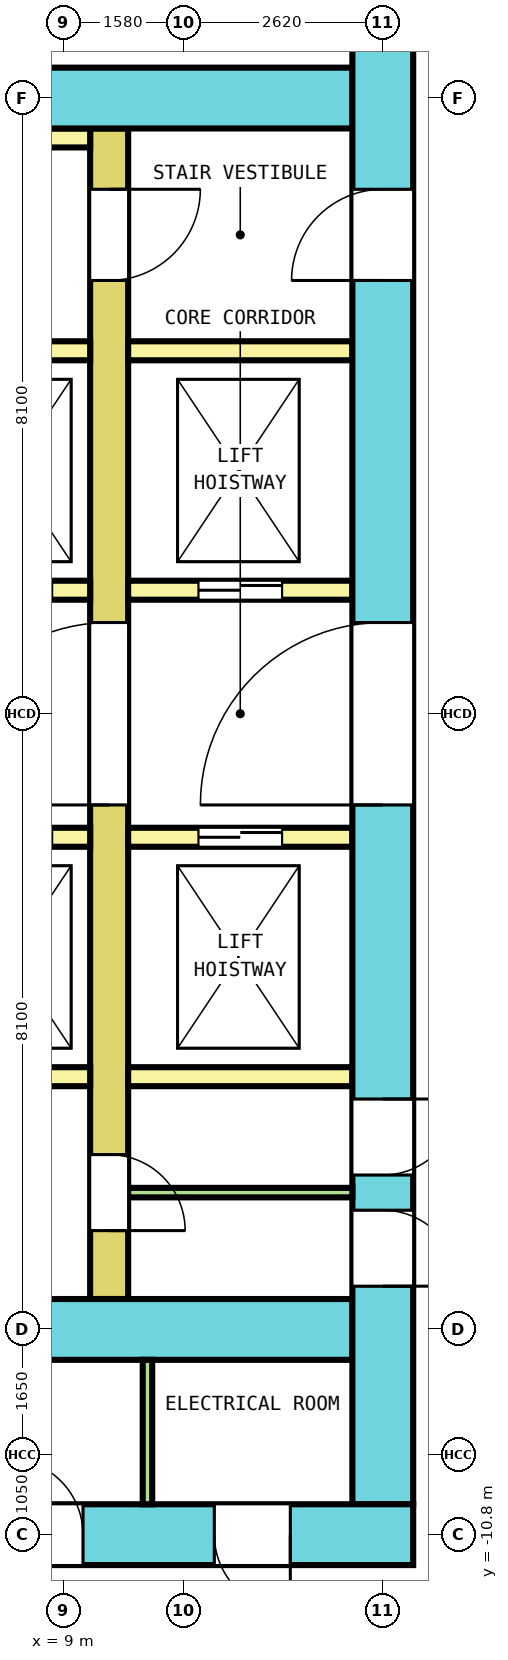
"""IFC4 building model, lengths in metres.
Left out: names, types, materials, properties, quantities, classifications, styles, units other than length and angle.
Written with IfcOpenShell. Run it as: python <this file> out.ifc"""

import sys

from ifc_helpers import new_model, si_unit, direction, frame, frame_2d, origin, place, context, subcontext, project, spatial, rectangle, extrude, element, fill, save


model = new_model("IFC4")
c1 = context("Model", 3, precision=1e-05, world=origin(), true_north=direction((0.0, 1.0)))
c2 = subcontext(c1, "Body", "Model", "MODEL_VIEW")
j1 = project(units=[si_unit("LENGTHUNIT", "METRE"), si_unit("PLANEANGLEUNIT", "RADIAN")], contexts=[c1])
p1 = place(None, origin())
s1 = spatial("IfcSite", under=j1, at=p1, CompositionType="ELEMENT")
p2 = place(p1, origin())
s2 = spatial("IfcBuilding", under=s1, at=p2, CompositionType="ELEMENT")
p3 = place(p2, frame((0.0, 0.0, 85.2)))
s3 = spatial("IfcBuildingStorey", under=s2, at=p3, CompositionType="ELEMENT", Elevation=85.2)
p4 = place(p3, frame((-13.6, -10.8, 0.0), z_axis=(0.0, 0.0, 1.0), x_axis=(1.0, 0.0, 0.0)))
e1 = element("IfcWall", 1, at=p4, inside=s3, PredefinedType="SHEAR", context=c2, shape_type="SweptSolid", body=[
    extrude(rectangle(XDim=27.2, YDim=0.8, at=frame_2d((13.6, 0.0))), origin(), (0.0, 0.0, 1.0), 4.1),
])
p5 = place(p4, frame((2.333, 0.0, 0.0)))
e2 = element("IfcOpeningElement", 2, at=p5, cuts=e1, PredefinedType="OPENING", context=c2, shape_type="SweptSolid", body=[
    extrude(rectangle(XDim=1.0, YDim=2.1, at=frame_2d((0.5, 1.05))), frame((0.0, 0.41, 0.0), z_axis=(0.0, -1.0, 0.0), x_axis=(1.0, 0.0, 0.0)), (0.0, 0.0, 1.0), 0.82),
])
p6 = place(p4, frame((6.494, 0.0, 0.0)))
e3 = element("IfcOpeningElement", 3, at=p6, cuts=e1, PredefinedType="OPENING", context=c2, shape_type="SweptSolid", body=[
    extrude(rectangle(XDim=1.0, YDim=2.1, at=frame_2d((0.5, 1.05))), frame((0.0, 0.41, 0.0), z_axis=(0.0, -1.0, 0.0), x_axis=(1.0, 0.0, 0.0)), (0.0, 0.0, 1.0), 0.82),
])
p7 = place(p4, frame((10.623, 0.0, 0.0)))
e4 = element("IfcOpeningElement", 4, at=p7, cuts=e1, PredefinedType="OPENING", context=c2, shape_type="SweptSolid", body=[
    extrude(rectangle(XDim=1.0, YDim=2.1, at=frame_2d((0.5, 1.05))), frame((0.0, 0.41, 0.0), z_axis=(0.0, -1.0, 0.0), x_axis=(1.0, 0.0, 0.0)), (0.0, 0.0, 1.0), 0.82),
])
p8 = place(p4, frame((19.16, 0.0, 0.0)))
e5 = element("IfcOpeningElement", 5, at=p8, cuts=e1, PredefinedType="OPENING", context=c2, shape_type="SweptSolid", body=[
    extrude(rectangle(XDim=1.0, YDim=2.1, at=frame_2d((0.5, 1.05))), frame((0.0, 0.41, 0.0), z_axis=(0.0, -1.0, 0.0), x_axis=(1.0, 0.0, 0.0)), (0.0, 0.0, 1.0), 0.82),
])
p9 = place(p4, frame((21.856, 0.0, 0.0)))
e6 = element("IfcOpeningElement", 6, at=p9, cuts=e1, PredefinedType="OPENING", context=c2, shape_type="SweptSolid", body=[
    extrude(rectangle(XDim=1.0, YDim=2.1, at=frame_2d((0.5, 1.05))), frame((0.0, 0.41, 0.0), z_axis=(0.0, -1.0, 0.0), x_axis=(1.0, 0.0, 0.0)), (0.0, 0.0, 1.0), 0.82),
])
p10 = place(p4, frame((24.583, 0.0, 0.0)))
e7 = element("IfcOpeningElement", 7, at=p10, cuts=e1, PredefinedType="OPENING", context=c2, shape_type="SweptSolid", body=[
    extrude(rectangle(XDim=1.0, YDim=2.1, at=frame_2d((0.5, 1.05))), frame((0.0, 0.41, 0.0), z_axis=(0.0, -1.0, 0.0), x_axis=(1.0, 0.0, 0.0)), (0.0, 0.0, 1.0), 0.82),
])
p11 = place(p4, frame((15.15, 0.0, 0.0)))
e8 = element("IfcOpeningElement", 8, at=p11, cuts=e1, PredefinedType="OPENING", context=c2, shape_type="SweptSolid", body=[
    extrude(rectangle(XDim=1.2, YDim=2.1, at=frame_2d((0.6, 1.05))), frame((0.0, 0.41, 0.0), z_axis=(0.0, -1.0, 0.0), x_axis=(1.0, 0.0, 0.0)), (0.0, 0.0, 1.0), 0.82),
])
p12 = place(p3, frame((13.2, -10.4, 0.0), z_axis=(0.0, 0.0, 1.0), x_axis=(0.0, 1.0, 0.0)))
e9 = element("IfcWall", 9, at=p12, inside=s3, PredefinedType="SHEAR", context=c2, shape_type="SweptSolid", body=[
    extrude(rectangle(XDim=20.8, YDim=0.8, at=frame_2d((10.4, 0.0))), origin(), (0.0, 0.0, 1.0), 4.1),
])
p13 = place(p12, frame((9.2, 0.0, 0.0)))
e10 = element("IfcOpeningElement", 10, at=p13, cuts=e9, PredefinedType="OPENING", context=c2, shape_type="SweptSolid", body=[
    extrude(rectangle(XDim=2.4, YDim=2.1, at=frame_2d((1.2, 1.05))), frame((0.0, 0.41, 0.0), z_axis=(0.0, -1.0, 0.0), x_axis=(1.0, 0.0, 0.0)), (0.0, 0.0, 1.0), 0.82),
])
p14 = place(p12, frame((16.1, 0.0, 0.0)))
e11 = element("IfcOpeningElement", 11, at=p14, cuts=e9, PredefinedType="OPENING", context=c2, shape_type="SweptSolid", body=[
    extrude(rectangle(XDim=1.2, YDim=2.1, at=frame_2d((0.6, 1.05))), frame((0.0, 0.41, 0.0), z_axis=(0.0, -1.0, 0.0), x_axis=(1.0, 0.0, 0.0)), (0.0, 0.0, 1.0), 0.82),
])
p15 = place(p12, frame((2.869, 0.0, 0.0)))
e12 = element("IfcOpeningElement", 12, at=p15, cuts=e9, PredefinedType="OPENING", context=c2, shape_type="SweptSolid", body=[
    extrude(rectangle(XDim=1.0, YDim=2.1, at=frame_2d((0.5, 1.05))), frame((0.0, 0.41, 0.0), z_axis=(0.0, -1.0, 0.0), x_axis=(1.0, 0.0, 0.0)), (0.0, 0.0, 1.0), 0.82),
])
p16 = place(p12, frame((4.331, 0.0, 0.0)))
e13 = element("IfcOpeningElement", 13, at=p16, cuts=e9, PredefinedType="OPENING", context=c2, shape_type="SweptSolid", body=[
    extrude(rectangle(XDim=1.0, YDim=2.1, at=frame_2d((0.5, 1.05))), frame((0.0, 0.41, 0.0), z_axis=(0.0, -1.0, 0.0), x_axis=(1.0, 0.0, 0.0)), (0.0, 0.0, 1.0), 0.82),
])
p17 = place(p3, frame((-12.8, 8.1, 0.0), z_axis=(0.0, 0.0, 1.0), x_axis=(1.0, 0.0, 0.0)))
e14 = element("IfcWall", 14, at=p17, inside=s3, PredefinedType="SHEAR", context=c2, shape_type="SweptSolid", body=[
    extrude(rectangle(XDim=25.6, YDim=0.8, at=frame_2d((12.8, 0.0))), origin(), (0.0, 0.0, 1.0), 4.1),
])
p18 = place(p17, frame((13.725, 0.0, 0.0)))
e15 = element("IfcOpeningElement", 15, at=p18, cuts=e14, PredefinedType="OPENING", context=c2, shape_type="SweptSolid", body=[
    extrude(rectangle(XDim=1.4, YDim=2.1, at=frame_2d((0.7, 1.05))), frame((0.0, 0.41, 0.0), z_axis=(0.0, -1.0, 0.0), x_axis=(1.0, 0.0, 0.0)), (0.0, 0.0, 1.0), 0.82),
])
p19 = place(p3, frame((-12.8, -8.1, 0.0), z_axis=(0.0, 0.0, 1.0), x_axis=(1.0, 0.0, 0.0)))
e16 = element("IfcWall", 16, at=p19, inside=s3, PredefinedType="SHEAR", context=c2, shape_type="SweptSolid", body=[
    extrude(rectangle(XDim=25.6, YDim=0.8, at=frame_2d((12.8, 0.0))), origin(), (0.0, 0.0, 1.0), 4.1),
])
p20 = place(p19, frame((14.35, 0.0, 0.0)))
e17 = element("IfcOpeningElement", 17, at=p20, cuts=e16, PredefinedType="OPENING", context=c2, shape_type="SweptSolid", body=[
    extrude(rectangle(XDim=1.2, YDim=2.1, at=frame_2d((0.6, 1.05))), frame((0.0, 0.41, 0.0), z_axis=(0.0, -1.0, 0.0), x_axis=(1.0, 0.0, 0.0)), (0.0, 0.0, 1.0), 0.82),
])
p21 = place(p3, frame((9.6, -7.7, 0.0), z_axis=(0.0, 0.0, 1.0), x_axis=(0.0, 1.0, 0.0)))
e18 = element("IfcWall", 18, at=p21, inside=s3, PredefinedType="SHEAR", context=c2, shape_type="SweptSolid", body=[
    extrude(rectangle(XDim=15.4, YDim=0.5, at=frame_2d((7.7, 0.0))), origin(), (0.0, 0.0, 1.0), 4.1),
])
p22 = place(p21, frame((6.5, 0.0, 0.0)))
e19 = element("IfcOpeningElement", 19, at=p22, cuts=e18, PredefinedType="OPENING", context=c2, shape_type="SweptSolid", body=[
    extrude(rectangle(XDim=2.4, YDim=2.1, at=frame_2d((1.2, 1.05))), frame((0.0, 0.26, 0.0), z_axis=(0.0, -1.0, 0.0), x_axis=(1.0, 0.0, 0.0)), (0.0, 0.0, 1.0), 0.52),
])
p23 = place(p21, frame((13.4, 0.0, 0.0)))
e20 = element("IfcOpeningElement", 20, at=p23, cuts=e18, PredefinedType="OPENING", context=c2, shape_type="SweptSolid", body=[
    extrude(rectangle(XDim=1.2, YDim=2.1, at=frame_2d((0.6, 1.05))), frame((0.0, 0.26, 0.0), z_axis=(0.0, -1.0, 0.0), x_axis=(1.0, 0.0, 0.0)), (0.0, 0.0, 1.0), 0.52),
])
p24 = place(p21, frame((0.9, 0.0, 0.0)))
e21 = element("IfcOpeningElement", 21, at=p24, cuts=e18, PredefinedType="OPENING", context=c2, shape_type="SweptSolid", body=[
    extrude(rectangle(XDim=1.0, YDim=2.1, at=frame_2d((0.5, 1.05))), frame((0.0, 0.26, 0.0), z_axis=(0.0, -1.0, 0.0), x_axis=(1.0, 0.0, 0.0)), (0.0, 0.0, 1.0), 0.52),
])
p25 = place(p3, frame((-9.35, 1.625, 0.0), z_axis=(0.0, 0.0, 1.0), x_axis=(1.0, 0.0, 0.0)))
e22 = element("IfcWall", 22, at=p25, inside=s3, PredefinedType="SOLIDWALL", context=c2, shape_type="SweptSolid", body=[
    extrude(rectangle(XDim=18.7, YDim=0.25, at=frame_2d((9.35, 0.0))), origin(), (0.0, 0.0, 1.0), 4.1),
])
p26 = place(p25, frame((0.5, 0.0, 0.0)))
e23 = element("IfcOpeningElement", 23, at=p26, cuts=e22, PredefinedType="OPENING", context=c2, shape_type="SweptSolid", body=[
    extrude(rectangle(XDim=1.1, YDim=2.1, at=frame_2d((0.55, 1.05))), frame((0.0, 0.135, 0.0), z_axis=(0.0, -1.0, 0.0), x_axis=(1.0, 0.0, 0.0)), (0.0, 0.0, 1.0), 0.27),
])
p27 = place(p25, frame((17.1, 0.0, 0.0)))
e24 = element("IfcOpeningElement", 24, at=p27, cuts=e22, PredefinedType="OPENING", context=c2, shape_type="SweptSolid", body=[
    extrude(rectangle(XDim=1.1, YDim=2.1, at=frame_2d((0.55, 1.05))), frame((0.0, 0.135, 0.0), z_axis=(0.0, -1.0, 0.0), x_axis=(1.0, 0.0, 0.0)), (0.0, 0.0, 1.0), 0.27),
])
p28 = place(p3, frame((9.85, 1.625, 0.0), z_axis=(0.0, 0.0, 1.0), x_axis=(1.0, 0.0, 0.0)))
e25 = element("IfcWall", 25, at=p28, inside=s3, PredefinedType="SOLIDWALL", context=c2, shape_type="SweptSolid", body=[
    extrude(rectangle(XDim=2.95, YDim=0.25, at=frame_2d((1.475, 0.0))), origin(), (0.0, 0.0, 1.0), 4.1),
])
p29 = place(p28, frame((0.925, 0.0, 0.0)))
e26 = element("IfcOpeningElement", 26, at=p29, cuts=e25, PredefinedType="OPENING", context=c2, shape_type="SweptSolid", body=[
    extrude(rectangle(XDim=1.1, YDim=2.1, at=frame_2d((0.55, 1.05))), frame((0.0, 0.135, 0.0), z_axis=(0.0, -1.0, 0.0), x_axis=(1.0, 0.0, 0.0)), (0.0, 0.0, 1.0), 0.27),
])
p30 = place(p3, frame((-9.35, 4.775, 0.0), z_axis=(0.0, 0.0, 1.0), x_axis=(1.0, 0.0, 0.0)))
e27 = element("IfcWall", 27, at=p30, inside=s3, PredefinedType="SOLIDWALL", context=c2, shape_type="SweptSolid", body=[
    extrude(rectangle(XDim=18.7, YDim=0.25, at=frame_2d((9.35, 0.0))), origin(), (0.0, 0.0, 1.0), 4.1),
])
p31 = place(p3, frame((9.85, 4.775, 0.0), z_axis=(0.0, 0.0, 1.0), x_axis=(1.0, 0.0, 0.0)))
e28 = element("IfcWall", 28, at=p31, inside=s3, PredefinedType="SOLIDWALL", context=c2, shape_type="SweptSolid", body=[
    extrude(rectangle(XDim=2.95, YDim=0.25, at=frame_2d((1.475, 0.0))), origin(), (0.0, 0.0, 1.0), 4.1),
])
p32 = place(p3, frame((-9.35, -1.625, 0.0), z_axis=(0.0, 0.0, 1.0), x_axis=(1.0, 0.0, 0.0)))
e29 = element("IfcWall", 29, at=p32, inside=s3, PredefinedType="SOLIDWALL", context=c2, shape_type="SweptSolid", body=[
    extrude(rectangle(XDim=18.7, YDim=0.25, at=frame_2d((9.35, 0.0))), origin(), (0.0, 0.0, 1.0), 4.1),
])
p33 = place(p32, frame((0.5, 0.0, 0.0)))
e30 = element("IfcOpeningElement", 30, at=p33, cuts=e29, PredefinedType="OPENING", context=c2, shape_type="SweptSolid", body=[
    extrude(rectangle(XDim=1.1, YDim=2.1, at=frame_2d((0.55, 1.05))), frame((0.0, 0.135, 0.0), z_axis=(0.0, -1.0, 0.0), x_axis=(1.0, 0.0, 0.0)), (0.0, 0.0, 1.0), 0.27),
])
p34 = place(p32, frame((17.1, 0.0, 0.0)))
e31 = element("IfcOpeningElement", 31, at=p34, cuts=e29, PredefinedType="OPENING", context=c2, shape_type="SweptSolid", body=[
    extrude(rectangle(XDim=1.1, YDim=2.1, at=frame_2d((0.55, 1.05))), frame((0.0, 0.135, 0.0), z_axis=(0.0, -1.0, 0.0), x_axis=(1.0, 0.0, 0.0)), (0.0, 0.0, 1.0), 0.27),
])
p35 = place(p3, frame((9.85, -1.625, 0.0), z_axis=(0.0, 0.0, 1.0), x_axis=(1.0, 0.0, 0.0)))
e32 = element("IfcWall", 32, at=p35, inside=s3, PredefinedType="SOLIDWALL", context=c2, shape_type="SweptSolid", body=[
    extrude(rectangle(XDim=2.95, YDim=0.25, at=frame_2d((1.475, 0.0))), origin(), (0.0, 0.0, 1.0), 4.1),
])
p36 = place(p35, frame((0.925, 0.0, 0.0)))
e33 = element("IfcOpeningElement", 33, at=p36, cuts=e32, PredefinedType="OPENING", context=c2, shape_type="SweptSolid", body=[
    extrude(rectangle(XDim=1.1, YDim=2.1, at=frame_2d((0.55, 1.05))), frame((0.0, 0.135, 0.0), z_axis=(0.0, -1.0, 0.0), x_axis=(1.0, 0.0, 0.0)), (0.0, 0.0, 1.0), 0.27),
])
p37 = place(p3, frame((-9.35, -4.775, 0.0), z_axis=(0.0, 0.0, 1.0), x_axis=(1.0, 0.0, 0.0)))
e34 = element("IfcWall", 34, at=p37, inside=s3, PredefinedType="SOLIDWALL", context=c2, shape_type="SweptSolid", body=[
    extrude(rectangle(XDim=18.7, YDim=0.25, at=frame_2d((9.35, 0.0))), origin(), (0.0, 0.0, 1.0), 4.1),
])
p38 = place(p3, frame((9.85, -4.775, 0.0), z_axis=(0.0, 0.0, 1.0), x_axis=(1.0, 0.0, 0.0)))
e35 = element("IfcWall", 35, at=p38, inside=s3, PredefinedType="SOLIDWALL", context=c2, shape_type="SweptSolid", body=[
    extrude(rectangle(XDim=2.95, YDim=0.25, at=frame_2d((1.475, 0.0))), origin(), (0.0, 0.0, 1.0), 4.1),
])
p39 = place(p3, frame((3.55, 7.575, 0.0), z_axis=(0.0, 0.0, 1.0), x_axis=(1.0, 0.0, 0.0)))
e36 = element("IfcWall", 36, at=p39, inside=s3, PredefinedType="SOLIDWALL", context=c2, shape_type="SweptSolid", body=[
    extrude(rectangle(XDim=5.8, YDim=0.25, at=frame_2d((2.9, 0.0))), origin(), (0.0, 0.0, 1.0), 4.1),
])
p40 = place(p3, frame((9.85, -6.3, 0.0), z_axis=(0.0, 0.0, 1.0), x_axis=(1.0, 0.0, 0.0)))
e37 = element("IfcWall", 37, at=p40, inside=s3, PredefinedType="PARTITIONING", context=c2, shape_type="SweptSolid", body=[
    extrude(rectangle(XDim=2.95, YDim=0.125, at=frame_2d((1.475, 0.0))), origin(), (0.0, 0.0, 1.0), 4.1),
])
p41 = place(p3, frame((10.104, -10.4, 0.0), z_axis=(0.0, 0.0, 1.0), x_axis=(0.0, 1.0, 0.0)))
e38 = element("IfcWall", 38, at=p41, inside=s3, PredefinedType="PARTITIONING", context=c2, shape_type="SweptSolid", body=[
    extrude(rectangle(XDim=1.9, YDim=0.125, at=frame_2d((0.95, 0.0))), origin(), (0.0, 0.0, 1.0), 4.1),
])
p42 = place(p27, origin())
e39 = element("IfcDoor", 39, at=p42, inside=s3, OperationType="DOUBLE_DOOR_SLIDING", PredefinedType="DOOR", context=c2, shape_type="SweptSolid", body=[
    extrude(rectangle(XDim=1.1, YDim=2.1, at=frame_2d((0.55, 1.05))), frame((0.0, 0.075, 0.0), z_axis=(0.0, -1.0, 0.0), x_axis=(1.0, 0.0, 0.0)), (0.0, 0.0, 1.0), 0.15),
])
fill(e24, e39)
p43 = place(p29, origin())
e40 = element("IfcDoor", 40, at=p43, inside=s3, OperationType="DOUBLE_DOOR_SLIDING", PredefinedType="DOOR", context=c2, shape_type="SweptSolid", body=[
    extrude(rectangle(XDim=1.1, YDim=2.1, at=frame_2d((0.55, 1.05))), frame((0.0, 0.075, 0.0), z_axis=(0.0, -1.0, 0.0), x_axis=(1.0, 0.0, 0.0)), (0.0, 0.0, 1.0), 0.15),
])
fill(e26, e40)
p44 = place(p34, origin())
e41 = element("IfcDoor", 41, at=p44, inside=s3, OperationType="DOUBLE_DOOR_SLIDING", PredefinedType="DOOR", context=c2, shape_type="SweptSolid", body=[
    extrude(rectangle(XDim=1.1, YDim=2.1, at=frame_2d((0.55, 1.05))), frame((0.0, 0.075, 0.0), z_axis=(0.0, -1.0, 0.0), x_axis=(1.0, 0.0, 0.0)), (0.0, 0.0, 1.0), 0.15),
])
fill(e31, e41)
p45 = place(p36, origin())
e42 = element("IfcDoor", 42, at=p45, inside=s3, OperationType="DOUBLE_DOOR_SLIDING", PredefinedType="DOOR", context=c2, shape_type="SweptSolid", body=[
    extrude(rectangle(XDim=1.1, YDim=2.1, at=frame_2d((0.55, 1.05))), frame((0.0, 0.075, 0.0), z_axis=(0.0, -1.0, 0.0), x_axis=(1.0, 0.0, 0.0)), (0.0, 0.0, 1.0), 0.15),
])
fill(e33, e42)
p46 = place(p22, origin())
e43 = element("IfcDoor", 43, at=p46, inside=s3, OperationType="DOUBLE_DOOR_SINGLE_SWING", PredefinedType="DOOR", context=c2, shape_type="SweptSolid", body=[
    extrude(rectangle(XDim=2.4, YDim=2.1, at=frame_2d((1.2, 1.05))), frame((0.0, 0.2, 0.0), z_axis=(0.0, -1.0, 0.0), x_axis=(1.0, 0.0, 0.0)), (0.0, 0.0, 1.0), 0.4),
])
fill(e19, e43)
p47 = place(p13, origin())
e44 = element("IfcDoor", 44, at=p47, inside=s3, OperationType="DOUBLE_DOOR_SINGLE_SWING", PredefinedType="DOOR", context=c2, shape_type="SweptSolid", body=[
    extrude(rectangle(XDim=2.4, YDim=2.1, at=frame_2d((1.2, 1.05))), frame((0.0, 0.3, 0.0), z_axis=(0.0, -1.0, 0.0), x_axis=(1.0, 0.0, 0.0)), (0.0, 0.0, 1.0), 0.6),
])
fill(e10, e44)
p48 = place(p23, origin())
e45 = element("IfcDoor", 45, at=p48, inside=s3, OperationType="SINGLE_SWING_LEFT", PredefinedType="DOOR", context=c2, shape_type="SweptSolid", body=[
    extrude(rectangle(XDim=1.2, YDim=2.1, at=frame_2d((0.6, 1.05))), frame((0.0, 0.2, 0.0), z_axis=(0.0, -1.0, 0.0), x_axis=(1.0, 0.0, 0.0)), (0.0, 0.0, 1.0), 0.4),
])
fill(e20, e45)
p49 = place(p14, origin())
e46 = element("IfcDoor", 46, at=p49, inside=s3, OperationType="SINGLE_SWING_RIGHT", PredefinedType="DOOR", context=c2, shape_type="SweptSolid", body=[
    extrude(rectangle(XDim=1.2, YDim=2.1, at=frame_2d((0.6, 1.05))), frame((0.0, 0.3, 0.0), z_axis=(0.0, -1.0, 0.0), x_axis=(1.0, 0.0, 0.0)), (0.0, 0.0, 1.0), 0.6),
])
fill(e11, e46)
p50 = place(p24, origin())
e47 = element("IfcDoor", 47, at=p50, inside=s3, OperationType="SINGLE_SWING_LEFT", PredefinedType="DOOR", context=c2, shape_type="SweptSolid", body=[
    extrude(rectangle(XDim=1.0, YDim=2.1, at=frame_2d((0.5, 1.05))), frame((0.0, 0.2, 0.0), z_axis=(0.0, -1.0, 0.0), x_axis=(1.0, 0.0, 0.0)), (0.0, 0.0, 1.0), 0.4),
])
fill(e21, e47)
p51 = place(p15, origin())
e48 = element("IfcDoor", 48, at=p51, inside=s3, OperationType="SINGLE_SWING_RIGHT", PredefinedType="DOOR", context=c2, shape_type="SweptSolid", body=[
    extrude(rectangle(XDim=1.0, YDim=2.1, at=frame_2d((0.5, 1.05))), frame((0.0, 0.3, 0.0), z_axis=(0.0, -1.0, 0.0), x_axis=(1.0, 0.0, 0.0)), (0.0, 0.0, 1.0), 0.6),
])
fill(e12, e48)
p52 = place(p16, origin())
e49 = element("IfcDoor", 49, at=p52, inside=s3, OperationType="SINGLE_SWING_LEFT", PredefinedType="DOOR", context=c2, shape_type="SweptSolid", body=[
    extrude(rectangle(XDim=1.0, YDim=2.1, at=frame_2d((0.5, 1.05))), frame((0.0, 0.3, 0.0), z_axis=(0.0, -1.0, 0.0), x_axis=(1.0, 0.0, 0.0)), (0.0, 0.0, 1.0), 0.6),
])
fill(e13, e49)
p53 = place(p9, origin())
e50 = element("IfcDoor", 50, at=p53, inside=s3, OperationType="SINGLE_SWING_RIGHT", PredefinedType="DOOR", context=c2, shape_type="SweptSolid", body=[
    extrude(rectangle(XDim=1.0, YDim=2.1, at=frame_2d((0.5, 1.05))), frame((0.0, 0.3, 0.0), z_axis=(0.0, -1.0, 0.0), x_axis=(1.0, 0.0, 0.0)), (0.0, 0.0, 1.0), 0.6),
])
fill(e6, e50)
p54 = place(p10, origin())
e51 = element("IfcDoor", 51, at=p54, inside=s3, OperationType="SINGLE_SWING_LEFT", PredefinedType="DOOR", context=c2, shape_type="SweptSolid", body=[
    extrude(rectangle(XDim=1.0, YDim=2.1, at=frame_2d((0.5, 1.05))), frame((0.0, 0.3, 0.0), z_axis=(0.0, -1.0, 0.0), x_axis=(1.0, 0.0, 0.0)), (0.0, 0.0, 1.0), 0.6),
])
fill(e7, e51)
save(model, sys.argv[1])
